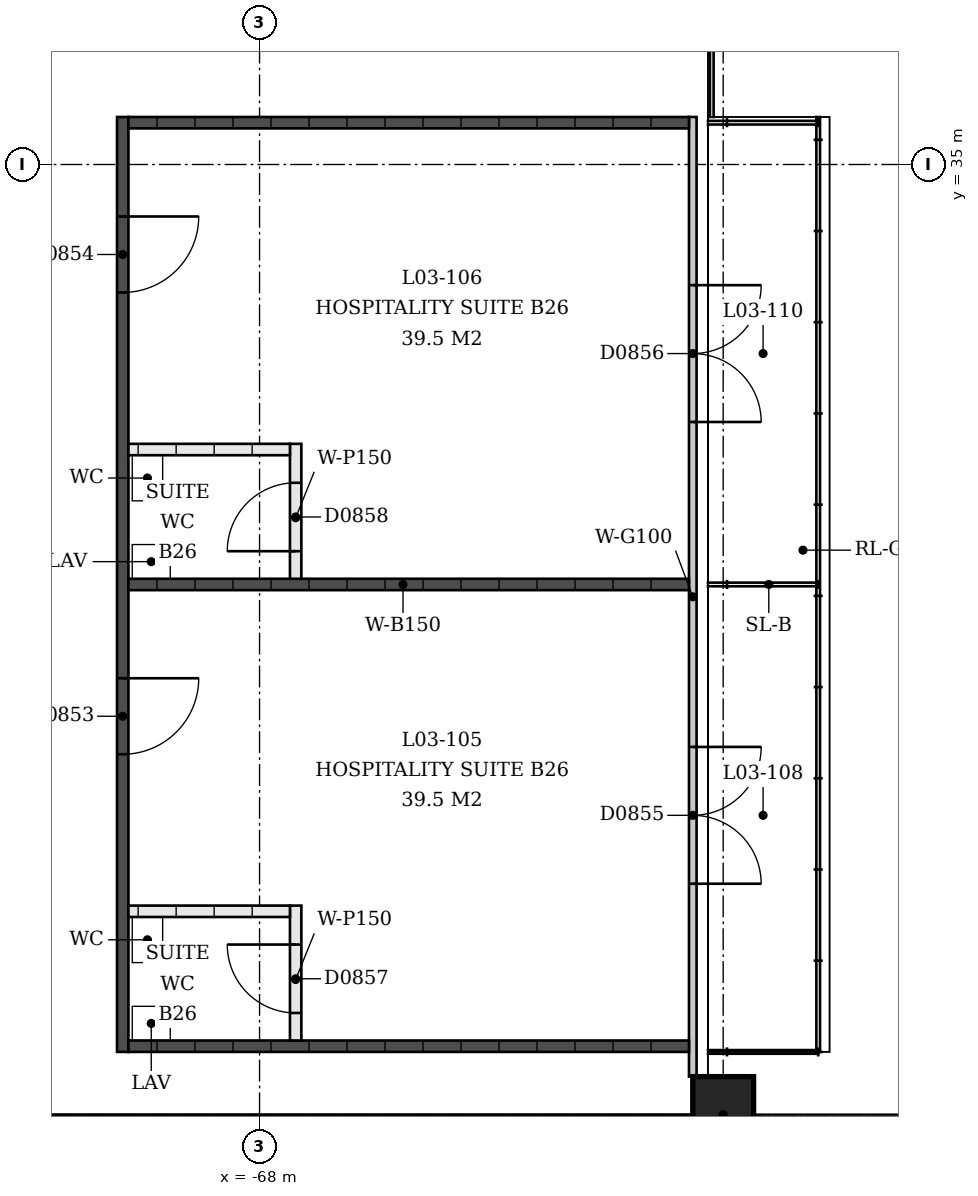
"""IFC4 building model, lengths in metres.
Left out: names, types, materials, properties, quantities, classifications, styles, units other than length and angle.
Written with IfcOpenShell. Run it as: python <this file> out.ifc"""

import sys

from ifc_helpers import new_model, si_unit, direction, frame, frame_2d, origin, origin_2d, place, context, subcontext, project, spatial, rectangle, extrude, element, fill, save


model = new_model("IFC4")
c1 = context("Model", 3, precision=1e-05, world=origin(), true_north=direction((0.0, 1.0)))
c2 = subcontext(c1, "Body", "Model", "MODEL_VIEW")
j1 = project(units=[si_unit("LENGTHUNIT", "METRE"), si_unit("PLANEANGLEUNIT", "RADIAN")], contexts=[c1])
p1 = place(None, origin())
s1 = spatial("IfcSite", under=j1, at=p1, CompositionType="ELEMENT")
p2 = place(p1, origin())
s2 = spatial("IfcBuilding", under=s1, at=p2, CompositionType="ELEMENT")
p3 = place(p2, frame((0.0, 0.0, 13.5)))
s3 = spatial("IfcBuildingStorey", under=s2, at=p3, CompositionType="ELEMENT", Elevation=13.5)
p4 = place(p3, frame((-61.9, 22.5, 0.0), z_axis=(0.0, 0.0, 1.0), x_axis=(0.0, -1.0, 0.0)))
e1 = element("IfcColumn", 1, at=p4, inside=s3, PredefinedType="COLUMN", context=c2, shape_type="SweptSolid", body=[
    extrude(rectangle(XDim=1.0, YDim=0.8, at=origin_2d()), origin(), (0.0, 0.0, 1.0), 2.033),
])
p5 = place(p3, frame((-62.3, 23.0, 0.0), z_axis=(0.0, 0.0, 1.0), x_axis=(0.0, 1.0, 0.0)))
e2 = element("IfcWall", 2, at=p5, inside=s3, PredefinedType="PARTITIONING", context=c2, shape_type="SweptSolid", body=[
    extrude(rectangle(XDim=12.625, YDim=0.1, at=frame_2d((6.312, 0.0))), origin(), (0.0, 0.0, 1.0), 3.0),
])
p6 = place(p5, frame((2.538, 0.0, 0.0)))
e3 = element("IfcOpeningElement", 3, at=p6, cuts=e2, PredefinedType="OPENING", context=c2, shape_type="SweptSolid", body=[
    extrude(rectangle(XDim=1.8, YDim=2.1, at=frame_2d((0.9, 1.05))), frame((0.0, 0.05, 0.0), z_axis=(0.0, -1.0, 0.0), x_axis=(1.0, 0.0, 0.0)), (0.0, 0.0, 1.0), 0.1),
])
p7 = place(p5, frame((8.613, 0.0, 0.0)))
e4 = element("IfcOpeningElement", 4, at=p7, cuts=e2, PredefinedType="OPENING", context=c2, shape_type="SweptSolid", body=[
    extrude(rectangle(XDim=1.8, YDim=2.1, at=frame_2d((0.9, 1.05))), frame((0.0, 0.05, 0.0), z_axis=(0.0, -1.0, 0.0), x_axis=(1.0, 0.0, 0.0)), (0.0, 0.0, 1.0), 0.1),
])
p8 = place(p3, frame((-69.8, 23.325, 0.0), z_axis=(0.0, 0.0, 1.0), x_axis=(0.0, 1.0, 0.0)))
e5 = element("IfcWall", 5, at=p8, inside=s3, PredefinedType="SOLIDWALL", context=c2, shape_type="SweptSolid", body=[
    extrude(rectangle(XDim=12.3, YDim=0.15, at=frame_2d((6.15, 0.0))), origin(), (0.0, 0.0, 1.0), 3.0),
])
p9 = place(p8, frame((3.916, 0.0, 0.0)))
e6 = element("IfcOpeningElement", 6, at=p9, cuts=e5, PredefinedType="OPENING", context=c2, shape_type="SweptSolid", body=[
    extrude(rectangle(XDim=1.0, YDim=2.1, at=frame_2d((0.5, 1.05))), frame((0.0, 0.075, 0.0), z_axis=(0.0, -1.0, 0.0), x_axis=(1.0, 0.0, 0.0)), (0.0, 0.0, 1.0), 0.15),
])
p10 = place(p8, frame((9.991, 0.0, 0.0)))
e7 = element("IfcOpeningElement", 7, at=p10, cuts=e5, PredefinedType="OPENING", context=c2, shape_type="SweptSolid", body=[
    extrude(rectangle(XDim=1.0, YDim=2.1, at=frame_2d((0.5, 1.05))), frame((0.0, 0.075, 0.0), z_axis=(0.0, -1.0, 0.0), x_axis=(1.0, 0.0, 0.0)), (0.0, 0.0, 1.0), 0.15),
])
for number, where, z_axis, x_axis in (
    (8, (-62.35, 23.4, 0.0), (0.0, 0.0, 1.0), (-1.0, 0.0, 0.0)),
    (9, (-62.35, 29.475, 0.0), (0.0, 0.0, 1.0), (-1.0, 0.0, 0.0)),
    (10, (-62.35, 35.55, 0.0), (0.0, 0.0, 1.0), (-1.0, 0.0, 0.0)),
):
    element("IfcWall", number, at=place(p3, frame(where, z_axis=z_axis, x_axis=x_axis)), inside=s3, PredefinedType="SOLIDWALL", context=c2, shape_type="SweptSolid", body=[
        extrude(rectangle(XDim=7.375, YDim=0.15, at=frame_2d((3.688, 0.0))), origin(), (0.0, 0.0, 1.0), 3.0),
    ])
p11 = place(p3, frame((-67.525, 23.475, 0.0), z_axis=(0.0, 0.0, 1.0), x_axis=(0.0, 1.0, 0.0)))
e11 = element("IfcWall", 11, at=p11, inside=s3, PredefinedType="PARTITIONING", context=c2, shape_type="SweptSolid", body=[
    extrude(rectangle(XDim=1.775, YDim=0.15, at=frame_2d((0.887, 0.0))), origin(), (0.0, 0.0, 1.0), 3.0),
])
p12 = place(p11, frame((0.363, 0.0, 0.0)))
e12 = element("IfcOpeningElement", 12, at=p12, cuts=e11, PredefinedType="OPENING", context=c2, shape_type="SweptSolid", body=[
    extrude(rectangle(XDim=0.9, YDim=2.1, at=frame_2d((0.45, 1.05))), frame((0.0, 0.075, 0.0), z_axis=(0.0, -1.0, 0.0), x_axis=(1.0, 0.0, 0.0)), (0.0, 0.0, 1.0), 0.15),
])
p13 = place(p3, frame((-67.6, 25.175, 0.0), z_axis=(0.0, 0.0, 1.0), x_axis=(-1.0, 0.0, 0.0)))
e13 = element("IfcWall", 13, at=p13, inside=s3, PredefinedType="PARTITIONING", context=c2, shape_type="SweptSolid", body=[
    extrude(rectangle(XDim=2.125, YDim=0.15, at=frame_2d((1.062, 0.0))), origin(), (0.0, 0.0, 1.0), 3.0),
])
p14 = place(p3, frame((-67.525, 29.55, 0.0), z_axis=(0.0, 0.0, 1.0), x_axis=(0.0, 1.0, 0.0)))
e14 = element("IfcWall", 14, at=p14, inside=s3, PredefinedType="PARTITIONING", context=c2, shape_type="SweptSolid", body=[
    extrude(rectangle(XDim=1.775, YDim=0.15, at=frame_2d((0.887, 0.0))), origin(), (0.0, 0.0, 1.0), 3.0),
])
p15 = place(p14, frame((0.363, 0.0, 0.0)))
e15 = element("IfcOpeningElement", 15, at=p15, cuts=e14, PredefinedType="OPENING", context=c2, shape_type="SweptSolid", body=[
    extrude(rectangle(XDim=0.9, YDim=2.1, at=frame_2d((0.45, 1.05))), frame((0.0, 0.075, 0.0), z_axis=(0.0, -1.0, 0.0), x_axis=(1.0, 0.0, 0.0)), (0.0, 0.0, 1.0), 0.15),
])
p16 = place(p3, frame((-67.6, 31.25, 0.0), z_axis=(0.0, 0.0, 1.0), x_axis=(-1.0, 0.0, 0.0)))
e16 = element("IfcWall", 16, at=p16, inside=s3, PredefinedType="PARTITIONING", context=c2, shape_type="SweptSolid", body=[
    extrude(rectangle(XDim=2.125, YDim=0.15, at=frame_2d((1.062, 0.0))), origin(), (0.0, 0.0, 1.0), 3.0),
])
p17 = place(p9, origin())
e17 = element("IfcDoor", 17, at=p17, inside=s3, OperationType="SINGLE_SWING_RIGHT", PredefinedType="DOOR", context=c2, shape_type="SweptSolid", body=[
    extrude(rectangle(XDim=1.0, YDim=2.1, at=frame_2d((0.5, 1.05))), frame((0.0, 0.025, 0.0), z_axis=(0.0, -1.0, 0.0), x_axis=(1.0, 0.0, 0.0)), (0.0, 0.0, 1.0), 0.05),
])
fill(e6, e17)
p18 = place(p10, origin())
e18 = element("IfcDoor", 18, at=p18, inside=s3, OperationType="SINGLE_SWING_RIGHT", PredefinedType="DOOR", context=c2, shape_type="SweptSolid", body=[
    extrude(rectangle(XDim=1.0, YDim=2.1, at=frame_2d((0.5, 1.05))), frame((0.0, 0.025, 0.0), z_axis=(0.0, -1.0, 0.0), x_axis=(1.0, 0.0, 0.0)), (0.0, 0.0, 1.0), 0.05),
])
fill(e7, e18)
p19 = place(p6, origin())
e19 = element("IfcDoor", 19, at=p19, inside=s3, OperationType="DOUBLE_DOOR_SINGLE_SWING", PredefinedType="DOOR", context=c2, shape_type="SweptSolid", body=[
    extrude(rectangle(XDim=1.8, YDim=2.1, at=frame_2d((0.9, 1.05))), frame((0.0, 0.025, 0.0), z_axis=(0.0, -1.0, 0.0), x_axis=(1.0, 0.0, 0.0)), (0.0, 0.0, 1.0), 0.05),
])
fill(e3, e19)
p20 = place(p7, origin())
e20 = element("IfcDoor", 20, at=p20, inside=s3, OperationType="DOUBLE_DOOR_SINGLE_SWING", PredefinedType="DOOR", context=c2, shape_type="SweptSolid", body=[
    extrude(rectangle(XDim=1.8, YDim=2.1, at=frame_2d((0.9, 1.05))), frame((0.0, 0.025, 0.0), z_axis=(0.0, -1.0, 0.0), x_axis=(1.0, 0.0, 0.0)), (0.0, 0.0, 1.0), 0.05),
])
fill(e4, e20)
p21 = place(p12, origin())
e21 = element("IfcDoor", 21, at=p21, inside=s3, OperationType="SINGLE_SWING_LEFT", PredefinedType="DOOR", context=c2, shape_type="SweptSolid", body=[
    extrude(rectangle(XDim=0.9, YDim=2.1, at=frame_2d((0.45, 1.05))), frame((0.0, 0.025, 0.0), z_axis=(0.0, -1.0, 0.0), x_axis=(1.0, 0.0, 0.0)), (0.0, 0.0, 1.0), 0.05),
])
fill(e12, e21)
p22 = place(p15, origin())
e22 = element("IfcDoor", 22, at=p22, inside=s3, OperationType="SINGLE_SWING_RIGHT", PredefinedType="DOOR", context=c2, shape_type="SweptSolid", body=[
    extrude(rectangle(XDim=0.9, YDim=2.1, at=frame_2d((0.45, 1.05))), frame((0.0, 0.025, 0.0), z_axis=(0.0, -1.0, 0.0), x_axis=(1.0, 0.0, 0.0)), (0.0, 0.0, 1.0), 0.05),
])
fill(e15, e22)
save(model, sys.argv[1])
